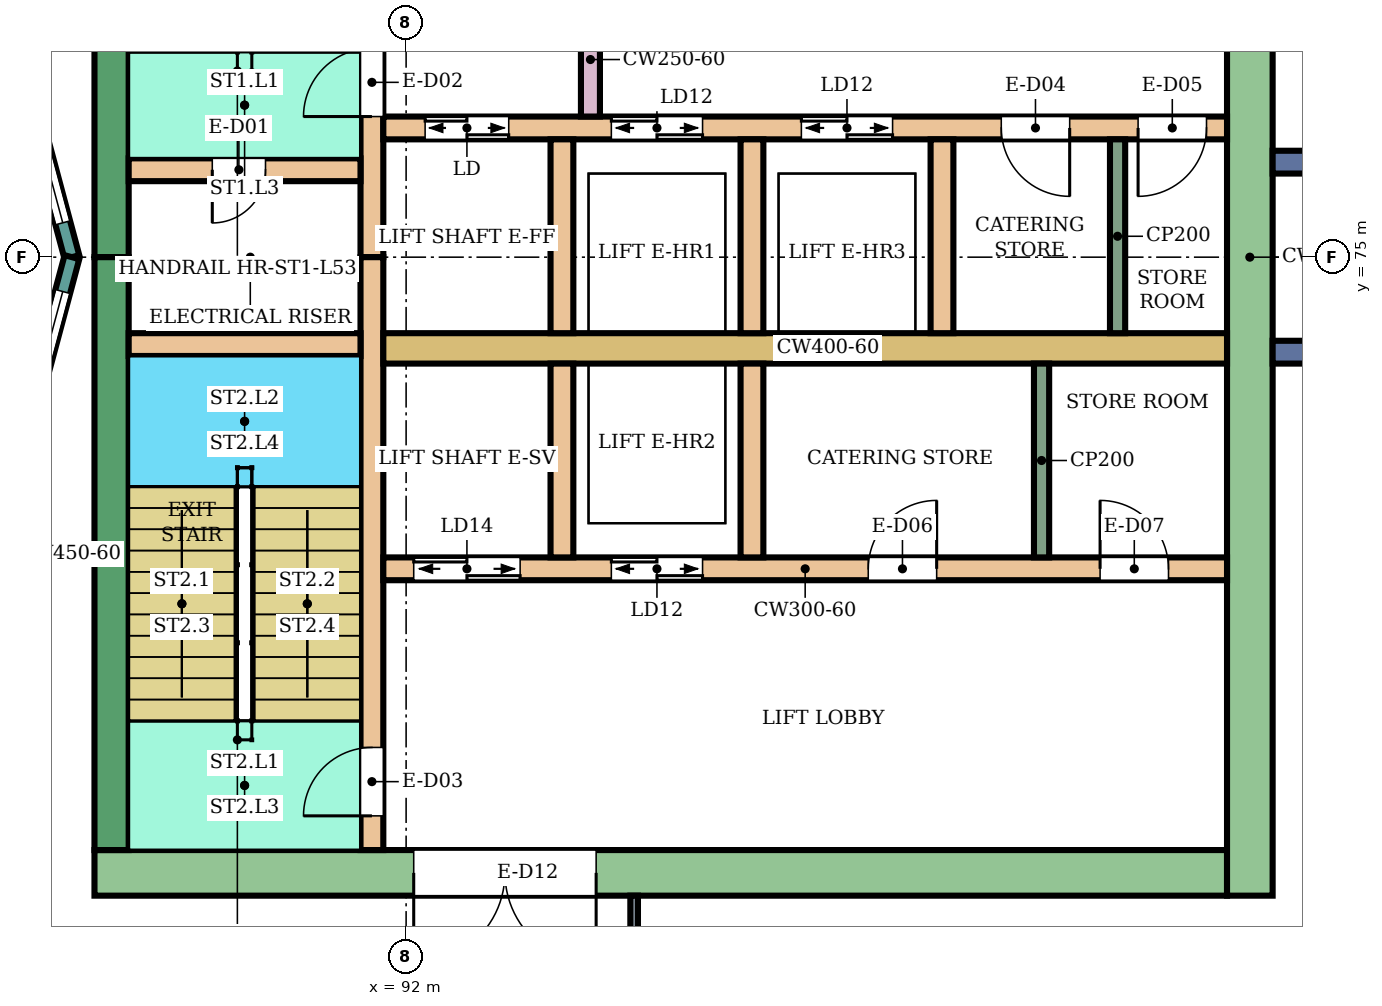
"""IFC4 building model, lengths in metres.
Left out: names, types, materials, properties, quantities, classifications, styles, units other than length and angle.
Written with IfcOpenShell. Run it as: python <this file> out.ifc"""

import sys

from ifc_helpers import new_model, si_unit, direction, frame, frame_2d, origin, place, context, subcontext, project, spatial, rectangle, extrude, element, fill, save


model = new_model("IFC4")
c1 = context("Model", 3, precision=1e-05, world=origin(), true_north=direction((0.0, 1.0)))
c2 = subcontext(c1, "Body", "Model", "MODEL_VIEW")
j1 = project(units=[si_unit("LENGTHUNIT", "METRE"), si_unit("PLANEANGLEUNIT", "RADIAN")], contexts=[c1])
p1 = place(None, origin())
s1 = spatial("IfcSite", under=j1, at=p1, CompositionType="ELEMENT")
p2 = place(p1, origin())
s2 = spatial("IfcBuilding", under=s1, at=p2, CompositionType="ELEMENT")
p3 = place(p2, frame((0.0, 0.0, 229.3)))
s3 = spatial("IfcBuildingStorey", under=s2, at=p3, CompositionType="ELEMENT", Elevation=229.3)
p4 = place(p3, frame((87.9, 66.9, 0.0), z_axis=(0.0, 0.0, 1.0), x_axis=(1.0, 0.0, 0.0)))
e1 = element("IfcWall", 1, at=p4, inside=s3, PredefinedType="SHEAR", context=c2, shape_type="SweptSolid", body=[
    extrude(rectangle(XDim=14.9, YDim=0.6, at=frame_2d((7.45, 0.0))), origin(), (0.0, 0.0, 1.0), 7.68),
])
p5 = place(p4, frame((4.2, 0.0, 0.0)))
e2 = element("IfcOpeningElement", 2, at=p5, cuts=e1, PredefinedType="OPENING", context=c2, shape_type="SweptSolid", body=[
    extrude(rectangle(XDim=2.4, YDim=2.4, at=frame_2d((1.2, 1.2))), frame((0.0, 0.31, 0.0), z_axis=(0.0, -1.0, 0.0), x_axis=(1.0, 0.0, 0.0)), (0.0, 0.0, 1.0), 0.62),
])
for number, where, z_axis, x_axis in (
    (3, (88.125, 75.0, 0.0), (0.0, 0.0, 1.0), (0.0, 1.0, 0.0)),
    (4, (88.125, 67.2, 0.0), (0.0, 0.0, 1.0), (0.0, 1.0, 0.0)),
):
    element("IfcWall", number, at=place(p3, frame(where, z_axis=z_axis, x_axis=x_axis)), inside=s3, PredefinedType="SHEAR", context=c2, shape_type="SweptSolid", body=[
        extrude(rectangle(XDim=7.8, YDim=0.45, at=frame_2d((3.9, 0.0))), origin(), (0.0, 0.0, 1.0), 7.68),
    ])
p6 = place(p3, frame((103.1, 66.6, 0.0), z_axis=(0.0, 0.0, 1.0), x_axis=(0.0, 1.0, 0.0)))
e5 = element("IfcWall", 5, at=p6, inside=s3, PredefinedType="SHEAR", context=c2, shape_type="SweptSolid", body=[
    extrude(rectangle(XDim=16.8, YDim=0.6, at=frame_2d((8.4, 0.0))), origin(), (0.0, 0.0, 1.0), 7.68),
])
p7 = place(p3, frame((91.55, 75.0, 0.0), z_axis=(0.0, 0.0, 1.0), x_axis=(0.0, 1.0, 0.0)))
e6 = element("IfcWall", 6, at=p7, inside=s3, PredefinedType="SHEAR", context=c2, shape_type="SweptSolid", body=[
    extrude(rectangle(XDim=7.8, YDim=0.3, at=frame_2d((3.9, 0.0))), origin(), (0.0, 0.0, 1.0), 7.68),
])
p8 = place(p7, frame((1.85, 0.0, 0.0)))
e7 = element("IfcOpeningElement", 7, at=p8, cuts=e6, PredefinedType="OPENING", context=c2, shape_type="SweptSolid", body=[
    extrude(rectangle(XDim=0.9, YDim=2.1, at=frame_2d((0.45, 1.05))), frame((0.0, 0.16, 0.0), z_axis=(0.0, -1.0, 0.0), x_axis=(1.0, 0.0, 0.0)), (0.0, 0.0, 1.0), 0.32),
])
p9 = place(p3, frame((91.55, 67.2, 0.0), z_axis=(0.0, 0.0, 1.0), x_axis=(0.0, 1.0, 0.0)))
e8 = element("IfcWall", 8, at=p9, inside=s3, PredefinedType="SHEAR", context=c2, shape_type="SweptSolid", body=[
    extrude(rectangle(XDim=7.8, YDim=0.3, at=frame_2d((3.9, 0.0))), origin(), (0.0, 0.0, 1.0), 7.68),
])
p10 = place(p9, frame((0.45, 0.0, 0.0)))
e9 = element("IfcOpeningElement", 9, at=p10, cuts=e8, PredefinedType="OPENING", context=c2, shape_type="SweptSolid", body=[
    extrude(rectangle(XDim=0.9, YDim=2.1, at=frame_2d((0.45, 1.05))), frame((0.0, 0.16, 0.0), z_axis=(0.0, -1.0, 0.0), x_axis=(1.0, 0.0, 0.0)), (0.0, 0.0, 1.0), 0.32),
])
p11 = place(p3, frame((88.35, 76.15, 0.0), z_axis=(0.0, 0.0, 1.0), x_axis=(1.0, 0.0, 0.0)))
e10 = element("IfcWall", 10, at=p11, inside=s3, PredefinedType="SHEAR", context=c2, shape_type="SweptSolid", body=[
    extrude(rectangle(XDim=3.05, YDim=0.3, at=frame_2d((1.525, 0.0))), origin(), (0.0, 0.0, 1.0), 7.68),
])
p12 = place(p11, frame((1.1, 0.0, 0.0)))
e11 = element("IfcOpeningElement", 11, at=p12, cuts=e10, PredefinedType="OPENING", context=c2, shape_type="SweptSolid", body=[
    extrude(rectangle(XDim=0.7, YDim=2.0, at=frame_2d((0.35, 1.0))), frame((0.0, 0.16, 0.0), z_axis=(0.0, -1.0, 0.0), x_axis=(1.0, 0.0, 0.0)), (0.0, 0.0, 1.0), 0.32),
])
p13 = place(p3, frame((88.35, 73.85, 0.0), z_axis=(0.0, 0.0, 1.0), x_axis=(1.0, 0.0, 0.0)))
e12 = element("IfcWall", 12, at=p13, inside=s3, PredefinedType="SHEAR", context=c2, shape_type="SweptSolid", body=[
    extrude(rectangle(XDim=3.05, YDim=0.3, at=frame_2d((1.525, 0.0))), origin(), (0.0, 0.0, 1.0), 7.68),
])
p14 = place(p3, frame((91.7, 76.7, 0.0), z_axis=(0.0, 0.0, 1.0), x_axis=(1.0, 0.0, 0.0)))
e13 = element("IfcWall", 13, at=p14, inside=s3, PredefinedType="SHEAR", context=c2, shape_type="SweptSolid", body=[
    extrude(rectangle(XDim=11.1, YDim=0.3, at=frame_2d((5.55, 0.0))), origin(), (0.0, 0.0, 1.0), 7.68),
])
p15 = place(p14, frame((0.55, 0.0, 0.0)))
e14 = element("IfcOpeningElement", 14, at=p15, cuts=e13, PredefinedType="OPENING", context=c2, shape_type="SweptSolid", body=[
    extrude(rectangle(XDim=1.1, YDim=2.1, at=frame_2d((0.55, 1.05))), frame((0.0, 0.16, 0.0), z_axis=(0.0, -1.0, 0.0), x_axis=(1.0, 0.0, 0.0)), (0.0, 0.0, 1.0), 0.32),
])
p16 = place(p14, frame((3.0, 0.0, 0.0)))
e15 = element("IfcOpeningElement", 15, at=p16, cuts=e13, PredefinedType="OPENING", context=c2, shape_type="SweptSolid", body=[
    extrude(rectangle(XDim=1.2, YDim=2.1, at=frame_2d((0.6, 1.05))), frame((0.0, 0.16, 0.0), z_axis=(0.0, -1.0, 0.0), x_axis=(1.0, 0.0, 0.0)), (0.0, 0.0, 1.0), 0.32),
])
p17 = place(p14, frame((5.5, 0.0, 0.0)))
e16 = element("IfcOpeningElement", 16, at=p17, cuts=e13, PredefinedType="OPENING", context=c2, shape_type="SweptSolid", body=[
    extrude(rectangle(XDim=1.2, YDim=2.1, at=frame_2d((0.6, 1.05))), frame((0.0, 0.16, 0.0), z_axis=(0.0, -1.0, 0.0), x_axis=(1.0, 0.0, 0.0)), (0.0, 0.0, 1.0), 0.32),
])
p18 = place(p14, frame((8.13, 0.0, 0.0)))
e17 = element("IfcOpeningElement", 17, at=p18, cuts=e13, PredefinedType="OPENING", context=c2, shape_type="SweptSolid", body=[
    extrude(rectangle(XDim=0.9, YDim=2.1, at=frame_2d((0.45, 1.05))), frame((0.0, 0.16, 0.0), z_axis=(0.0, -1.0, 0.0), x_axis=(1.0, 0.0, 0.0)), (0.0, 0.0, 1.0), 0.32),
])
p19 = place(p14, frame((9.93, 0.0, 0.0)))
e18 = element("IfcOpeningElement", 18, at=p19, cuts=e13, PredefinedType="OPENING", context=c2, shape_type="SweptSolid", body=[
    extrude(rectangle(XDim=0.9, YDim=2.1, at=frame_2d((0.45, 1.05))), frame((0.0, 0.16, 0.0), z_axis=(0.0, -1.0, 0.0), x_axis=(1.0, 0.0, 0.0)), (0.0, 0.0, 1.0), 0.32),
])
p20 = place(p3, frame((91.7, 73.8, 0.0), z_axis=(0.0, 0.0, 1.0), x_axis=(1.0, 0.0, 0.0)))
e19 = element("IfcWall", 19, at=p20, inside=s3, PredefinedType="SHEAR", context=c2, shape_type="SweptSolid", body=[
    extrude(rectangle(XDim=11.1, YDim=0.4, at=frame_2d((5.55, 0.0))), origin(), (0.0, 0.0, 1.0), 7.68),
])
p21 = place(p3, frame((91.7, 70.9, 0.0), z_axis=(0.0, 0.0, 1.0), x_axis=(1.0, 0.0, 0.0)))
e20 = element("IfcWall", 20, at=p21, inside=s3, PredefinedType="SHEAR", context=c2, shape_type="SweptSolid", body=[
    extrude(rectangle(XDim=11.1, YDim=0.3, at=frame_2d((5.55, 0.0))), origin(), (0.0, 0.0, 1.0), 7.68),
])
p22 = place(p21, frame((0.4, 0.0, 0.0)))
e21 = element("IfcOpeningElement", 21, at=p22, cuts=e20, PredefinedType="OPENING", context=c2, shape_type="SweptSolid", body=[
    extrude(rectangle(XDim=1.4, YDim=2.1, at=frame_2d((0.7, 1.05))), frame((0.0, 0.16, 0.0), z_axis=(0.0, -1.0, 0.0), x_axis=(1.0, 0.0, 0.0)), (0.0, 0.0, 1.0), 0.32),
])
p23 = place(p21, frame((3.0, 0.0, 0.0)))
e22 = element("IfcOpeningElement", 22, at=p23, cuts=e20, PredefinedType="OPENING", context=c2, shape_type="SweptSolid", body=[
    extrude(rectangle(XDim=1.2, YDim=2.1, at=frame_2d((0.6, 1.05))), frame((0.0, 0.16, 0.0), z_axis=(0.0, -1.0, 0.0), x_axis=(1.0, 0.0, 0.0)), (0.0, 0.0, 1.0), 0.32),
])
p24 = place(p21, frame((6.38, 0.0, 0.0)))
e23 = element("IfcOpeningElement", 23, at=p24, cuts=e20, PredefinedType="OPENING", context=c2, shape_type="SweptSolid", body=[
    extrude(rectangle(XDim=0.9, YDim=2.1, at=frame_2d((0.45, 1.05))), frame((0.0, 0.16, 0.0), z_axis=(0.0, -1.0, 0.0), x_axis=(1.0, 0.0, 0.0)), (0.0, 0.0, 1.0), 0.32),
])
p25 = place(p21, frame((9.43, 0.0, 0.0)))
e24 = element("IfcOpeningElement", 24, at=p25, cuts=e20, PredefinedType="OPENING", context=c2, shape_type="SweptSolid", body=[
    extrude(rectangle(XDim=0.9, YDim=2.1, at=frame_2d((0.45, 1.05))), frame((0.0, 0.16, 0.0), z_axis=(0.0, -1.0, 0.0), x_axis=(1.0, 0.0, 0.0)), (0.0, 0.0, 1.0), 0.32),
])
for number, where, z_axis, x_axis in (
    (25, (94.05, 74.0, 0.0), (0.0, 0.0, 1.0), (0.0, 1.0, 0.0)),
    (26, (96.55, 74.0, 0.0), (0.0, 0.0, 1.0), (0.0, 1.0, 0.0)),
    (27, (99.05, 74.0, 0.0), (0.0, 0.0, 1.0), (0.0, 1.0, 0.0)),
    (28, (94.05, 71.05, 0.0), (0.0, 0.0, 1.0), (0.0, 1.0, 0.0)),
    (29, (96.55, 71.05, 0.0), (0.0, 0.0, 1.0), (0.0, 1.0, 0.0)),
):
    element("IfcWall", number, at=place(p3, frame(where, z_axis=z_axis, x_axis=x_axis)), inside=s3, PredefinedType="SHEAR", context=c2, shape_type="SweptSolid", body=[
        extrude(rectangle(XDim=2.55, YDim=0.3, at=frame_2d((1.275, 0.0))), origin(), (0.0, 0.0, 1.0), 7.68),
    ])
p26 = place(p3, frame((94.425, 76.85, 0.0), z_axis=(0.0, 0.0, 1.0), x_axis=(0.0, 1.0, 0.0)))
e30 = element("IfcWall", 30, at=p26, inside=s3, PredefinedType="SHEAR", context=c2, shape_type="SweptSolid", body=[
    extrude(rectangle(XDim=1.5, YDim=0.25, at=frame_2d((0.75, 0.0))), origin(), (0.0, 0.0, 1.0), 7.68),
])
for number, where, z_axis, x_axis in (
    (31, (103.4, 73.75, 0.0), (0.0, 0.0, 1.0), (1.0, 0.0, 0.0)),
    (32, (103.4, 76.25, 0.0), (0.0, 0.0, 1.0), (1.0, 0.0, 0.0)),
):
    element("IfcWall", number, at=place(p3, frame(where, z_axis=z_axis, x_axis=x_axis)), inside=s3, PredefinedType="NOTDEFINED", context=c2, shape_type="SweptSolid", body=[
        extrude(rectangle(XDim=2.416, YDim=0.3, at=frame_2d((1.208, 0.0))), origin(), (0.0, 0.0, 1.0), 8.0),
    ])
p27 = place(p3, frame((87.604, 75.0, 0.0), z_axis=(0.0, 0.0, 1.0), x_axis=(-0.258789828301, 0.965933654434, 0.0)))
e33 = element("IfcWall", 33, at=p27, inside=s3, PredefinedType="NOTDEFINED", context=c2, shape_type="SweptSolid", body=[
    extrude(rectangle(XDim=3.936, YDim=0.2, at=frame_2d((1.968, 0.0))), origin(), (0.0, 0.0, 1.0), 8.0),
])
p28 = place(p27, frame((0.468, 0.0, 0.9)))
e34 = element("IfcOpeningElement", 34, at=p28, cuts=e33, PredefinedType="OPENING", context=c2, shape_type="SweptSolid", body=[
    extrude(rectangle(XDim=3.0, YDim=2.3, at=frame_2d((1.5, 1.15))), frame((0.0, 0.11, 0.0), z_axis=(0.0, -1.0, 0.0), x_axis=(1.0, 0.0, 0.0)), (0.0, 0.0, 1.0), 0.22),
])
p29 = place(p3, frame((86.585, 71.198, 0.0), z_axis=(0.0, 0.0, 1.0), x_axis=(0.258789828301, 0.965933654434, 0.0)))
e35 = element("IfcWall", 35, at=p29, inside=s3, PredefinedType="NOTDEFINED", context=c2, shape_type="SweptSolid", body=[
    extrude(rectangle(XDim=3.936, YDim=0.2, at=frame_2d((1.968, 0.0))), origin(), (0.0, 0.0, 1.0), 8.0),
])
p30 = place(p29, frame((0.468, 0.0, 0.9)))
e36 = element("IfcOpeningElement", 36, at=p30, cuts=e35, PredefinedType="OPENING", context=c2, shape_type="SweptSolid", body=[
    extrude(rectangle(XDim=3.0, YDim=2.3, at=frame_2d((1.5, 1.15))), frame((0.0, 0.11, 0.0), z_axis=(0.0, -1.0, 0.0), x_axis=(1.0, 0.0, 0.0)), (0.0, 0.0, 1.0), 0.22),
])
p31 = place(p3, frame((84.475, 67.249, 0.0), z_axis=(0.0, 0.0, 1.0), x_axis=(0.499996545922, -0.866027397988, 0.0)))
e37 = element("IfcWall", 37, at=p31, inside=s3, PredefinedType="NOTDEFINED", context=c2, shape_type="SweptSolid", body=[
    extrude(rectangle(XDim=8.25, YDim=0.2, at=frame_2d((4.125, 0.0))), origin(), (0.0, 0.0, 1.0), 8.0),
])
p32 = place(p31, frame((1.0, 0.0, 0.3)))
e38 = element("IfcOpeningElement", 38, at=p32, cuts=e37, PredefinedType="OPENING", context=c2, shape_type="SweptSolid", body=[
    extrude(rectangle(XDim=2.4, YDim=3.6, at=frame_2d((1.2, 1.8))), frame((0.0, 0.11, 0.0), z_axis=(0.0, -1.0, 0.0), x_axis=(1.0, 0.0, 0.0)), (0.0, 0.0, 1.0), 0.22),
])
p33 = place(p31, frame((3.85, 0.0, 0.0)))
e39 = element("IfcOpeningElement", 39, at=p33, cuts=e37, PredefinedType="OPENING", context=c2, shape_type="SweptSolid", body=[
    extrude(rectangle(XDim=1.8, YDim=2.4, at=frame_2d((0.9, 1.2))), frame((0.0, 0.11, 0.0), z_axis=(0.0, -1.0, 0.0), x_axis=(1.0, 0.0, 0.0)), (0.0, 0.0, 1.0), 0.22),
])
p34 = place(p31, frame((6.1, 0.0, 0.3)))
e40 = element("IfcOpeningElement", 40, at=p34, cuts=e37, PredefinedType="OPENING", context=c2, shape_type="SweptSolid", body=[
    extrude(rectangle(XDim=1.6, YDim=3.6, at=frame_2d((0.8, 1.8))), frame((0.0, 0.11, 0.0), z_axis=(0.0, -1.0, 0.0), x_axis=(1.0, 0.0, 0.0)), (0.0, 0.0, 1.0), 0.22),
])
p35 = place(p3, frame((95.0, 54.27, 0.0), z_axis=(0.0, 0.0, 1.0), x_axis=(0.0, 1.0, 0.0)))
e41 = element("IfcWall", 41, at=p35, inside=s3, PredefinedType="PARTITIONING", context=c2, shape_type="SweptSolid", body=[
    extrude(rectangle(XDim=12.33, YDim=0.1, at=frame_2d((6.165, 0.0))), origin(), (0.0, 0.0, 1.0), 7.55),
])
p36 = place(p35, frame((6.309, 0.0, 0.0)))
e42 = element("IfcOpeningElement", 42, at=p36, cuts=e41, PredefinedType="OPENING", context=c2, shape_type="SweptSolid", body=[
    extrude(rectangle(XDim=1.8, YDim=2.1, at=frame_2d((0.9, 1.05))), frame((0.0, 0.06, 0.0), z_axis=(0.0, -1.0, 0.0), x_axis=(1.0, 0.0, 0.0)), (0.0, 0.0, 1.0), 0.12),
])
for number, where, z_axis, x_axis in (
    (43, (101.36, 74.0, 0.0), (0.0, 0.0, 1.0), (0.0, 1.0, 0.0)),
    (44, (100.36, 71.05, 0.0), (0.0, 0.0, 1.0), (0.0, 1.0, 0.0)),
):
    element("IfcWall", number, at=place(p3, frame(where, z_axis=z_axis, x_axis=x_axis)), inside=s3, PredefinedType="PARTITIONING", context=c2, shape_type="SweptSolid", body=[
        extrude(rectangle(XDim=2.55, YDim=0.2, at=frame_2d((1.275, 0.0))), origin(), (0.0, 0.0, 1.0), 7.68),
    ])
p37 = place(p28, origin())
e45 = element("IfcWindow", 45, at=p37, inside=s3, PartitioningType="SINGLE_PANEL", PredefinedType="WINDOW", context=c2, shape_type="SweptSolid", body=[
    extrude(rectangle(XDim=3.0, YDim=2.3, at=frame_2d((1.5, 1.15))), frame((0.0, 0.03, 0.0), z_axis=(0.0, -1.0, 0.0), x_axis=(1.0, 0.0, 0.0)), (0.0, 0.0, 1.0), 0.06),
])
fill(e34, e45)
p38 = place(p30, origin())
e46 = element("IfcWindow", 46, at=p38, inside=s3, PartitioningType="SINGLE_PANEL", PredefinedType="WINDOW", context=c2, shape_type="SweptSolid", body=[
    extrude(rectangle(XDim=3.0, YDim=2.3, at=frame_2d((1.5, 1.15))), frame((0.0, 0.03, 0.0), z_axis=(0.0, -1.0, 0.0), x_axis=(1.0, 0.0, 0.0)), (0.0, 0.0, 1.0), 0.06),
])
fill(e36, e46)
p39 = place(p12, frame((0.7, 0.0, 0.0), z_axis=(0.0, 0.0, 1.0), x_axis=(-1.0, 0.0, 0.0)))
e47 = element("IfcDoor", 47, at=p39, inside=s3, OperationType="SINGLE_SWING_RIGHT", PredefinedType="DOOR", context=c2, shape_type="SweptSolid", body=[
    extrude(rectangle(XDim=0.7, YDim=2.0, at=frame_2d((0.35, 1.0))), frame((0.0, 0.025, 0.0), z_axis=(0.0, -1.0, 0.0), x_axis=(1.0, 0.0, 0.0)), (0.0, 0.0, 1.0), 0.05),
])
fill(e11, e47)
p40 = place(p8, origin())
e48 = element("IfcDoor", 48, at=p40, inside=s3, OperationType="SINGLE_SWING_LEFT", PredefinedType="DOOR", context=c2, shape_type="SweptSolid", body=[
    extrude(rectangle(XDim=0.9, YDim=2.1, at=frame_2d((0.45, 1.05))), frame((0.0, 0.025, 0.0), z_axis=(0.0, -1.0, 0.0), x_axis=(1.0, 0.0, 0.0)), (0.0, 0.0, 1.0), 0.05),
])
fill(e7, e48)
p41 = place(p10, origin())
e49 = element("IfcDoor", 49, at=p41, inside=s3, OperationType="SINGLE_SWING_LEFT", PredefinedType="DOOR", context=c2, shape_type="SweptSolid", body=[
    extrude(rectangle(XDim=0.9, YDim=2.1, at=frame_2d((0.45, 1.05))), frame((0.0, 0.025, 0.0), z_axis=(0.0, -1.0, 0.0), x_axis=(1.0, 0.0, 0.0)), (0.0, 0.0, 1.0), 0.05),
])
fill(e9, e49)
p42 = place(p15, origin())
e50 = element("IfcDoor", 50, at=p42, inside=s3, OperationType="DOUBLE_DOOR_SLIDING", PredefinedType="DOOR", context=c2, shape_type="SweptSolid", body=[
    extrude(rectangle(XDim=1.1, YDim=2.1, at=frame_2d((0.55, 1.05))), frame((0.0, 0.025, 0.0), z_axis=(0.0, -1.0, 0.0), x_axis=(1.0, 0.0, 0.0)), (0.0, 0.0, 1.0), 0.05),
])
fill(e14, e50)
p43 = place(p16, origin())
e51 = element("IfcDoor", 51, at=p43, inside=s3, OperationType="DOUBLE_DOOR_SLIDING", PredefinedType="DOOR", context=c2, shape_type="SweptSolid", body=[
    extrude(rectangle(XDim=1.2, YDim=2.1, at=frame_2d((0.6, 1.05))), frame((0.0, 0.025, 0.0), z_axis=(0.0, -1.0, 0.0), x_axis=(1.0, 0.0, 0.0)), (0.0, 0.0, 1.0), 0.05),
])
fill(e15, e51)
p44 = place(p17, origin())
e52 = element("IfcDoor", 52, at=p44, inside=s3, OperationType="DOUBLE_DOOR_SLIDING", PredefinedType="DOOR", context=c2, shape_type="SweptSolid", body=[
    extrude(rectangle(XDim=1.2, YDim=2.1, at=frame_2d((0.6, 1.05))), frame((0.0, 0.025, 0.0), z_axis=(0.0, -1.0, 0.0), x_axis=(1.0, 0.0, 0.0)), (0.0, 0.0, 1.0), 0.05),
])
fill(e16, e52)
p45 = place(p18, frame((0.9, 0.0, 0.0), z_axis=(0.0, 0.0, 1.0), x_axis=(-1.0, 0.0, 0.0)))
e53 = element("IfcDoor", 53, at=p45, inside=s3, OperationType="SINGLE_SWING_LEFT", PredefinedType="DOOR", context=c2, shape_type="SweptSolid", body=[
    extrude(rectangle(XDim=0.9, YDim=2.1, at=frame_2d((0.45, 1.05))), frame((0.0, 0.025, 0.0), z_axis=(0.0, -1.0, 0.0), x_axis=(1.0, 0.0, 0.0)), (0.0, 0.0, 1.0), 0.05),
])
fill(e17, e53)
p46 = place(p19, frame((0.9, 0.0, 0.0), z_axis=(0.0, 0.0, 1.0), x_axis=(-1.0, 0.0, 0.0)))
e54 = element("IfcDoor", 54, at=p46, inside=s3, OperationType="SINGLE_SWING_RIGHT", PredefinedType="DOOR", context=c2, shape_type="SweptSolid", body=[
    extrude(rectangle(XDim=0.9, YDim=2.1, at=frame_2d((0.45, 1.05))), frame((0.0, 0.025, 0.0), z_axis=(0.0, -1.0, 0.0), x_axis=(1.0, 0.0, 0.0)), (0.0, 0.0, 1.0), 0.05),
])
fill(e18, e54)
p47 = place(p22, origin())
e55 = element("IfcDoor", 55, at=p47, inside=s3, OperationType="DOUBLE_DOOR_SLIDING", PredefinedType="DOOR", context=c2, shape_type="SweptSolid", body=[
    extrude(rectangle(XDim=1.4, YDim=2.1, at=frame_2d((0.7, 1.05))), frame((0.0, 0.025, 0.0), z_axis=(0.0, -1.0, 0.0), x_axis=(1.0, 0.0, 0.0)), (0.0, 0.0, 1.0), 0.05),
])
fill(e21, e55)
p48 = place(p23, origin())
e56 = element("IfcDoor", 56, at=p48, inside=s3, OperationType="DOUBLE_DOOR_SLIDING", PredefinedType="DOOR", context=c2, shape_type="SweptSolid", body=[
    extrude(rectangle(XDim=1.2, YDim=2.1, at=frame_2d((0.6, 1.05))), frame((0.0, 0.025, 0.0), z_axis=(0.0, -1.0, 0.0), x_axis=(1.0, 0.0, 0.0)), (0.0, 0.0, 1.0), 0.05),
])
fill(e22, e56)
p49 = place(p24, origin())
e57 = element("IfcDoor", 57, at=p49, inside=s3, OperationType="SINGLE_SWING_RIGHT", PredefinedType="DOOR", context=c2, shape_type="SweptSolid", body=[
    extrude(rectangle(XDim=0.9, YDim=2.1, at=frame_2d((0.45, 1.05))), frame((0.0, 0.025, 0.0), z_axis=(0.0, -1.0, 0.0), x_axis=(1.0, 0.0, 0.0)), (0.0, 0.0, 1.0), 0.05),
])
fill(e23, e57)
p50 = place(p25, origin())
e58 = element("IfcDoor", 58, at=p50, inside=s3, OperationType="SINGLE_SWING_LEFT", PredefinedType="DOOR", context=c2, shape_type="SweptSolid", body=[
    extrude(rectangle(XDim=0.9, YDim=2.1, at=frame_2d((0.45, 1.05))), frame((0.0, 0.025, 0.0), z_axis=(0.0, -1.0, 0.0), x_axis=(1.0, 0.0, 0.0)), (0.0, 0.0, 1.0), 0.05),
])
fill(e24, e58)
p51 = place(p5, frame((2.4, 0.0, 0.0), z_axis=(0.0, 0.0, 1.0), x_axis=(-1.0, 0.0, 0.0)))
e59 = element("IfcDoor", 59, at=p51, inside=s3, OperationType="DOUBLE_DOOR_SINGLE_SWING", PredefinedType="DOOR", context=c2, shape_type="SweptSolid", body=[
    extrude(rectangle(XDim=2.4, YDim=2.4, at=frame_2d((1.2, 1.2))), frame((0.0, 0.025, 0.0), z_axis=(0.0, -1.0, 0.0), x_axis=(1.0, 0.0, 0.0)), (0.0, 0.0, 1.0), 0.05),
])
fill(e2, e59)
save(model, sys.argv[1])
